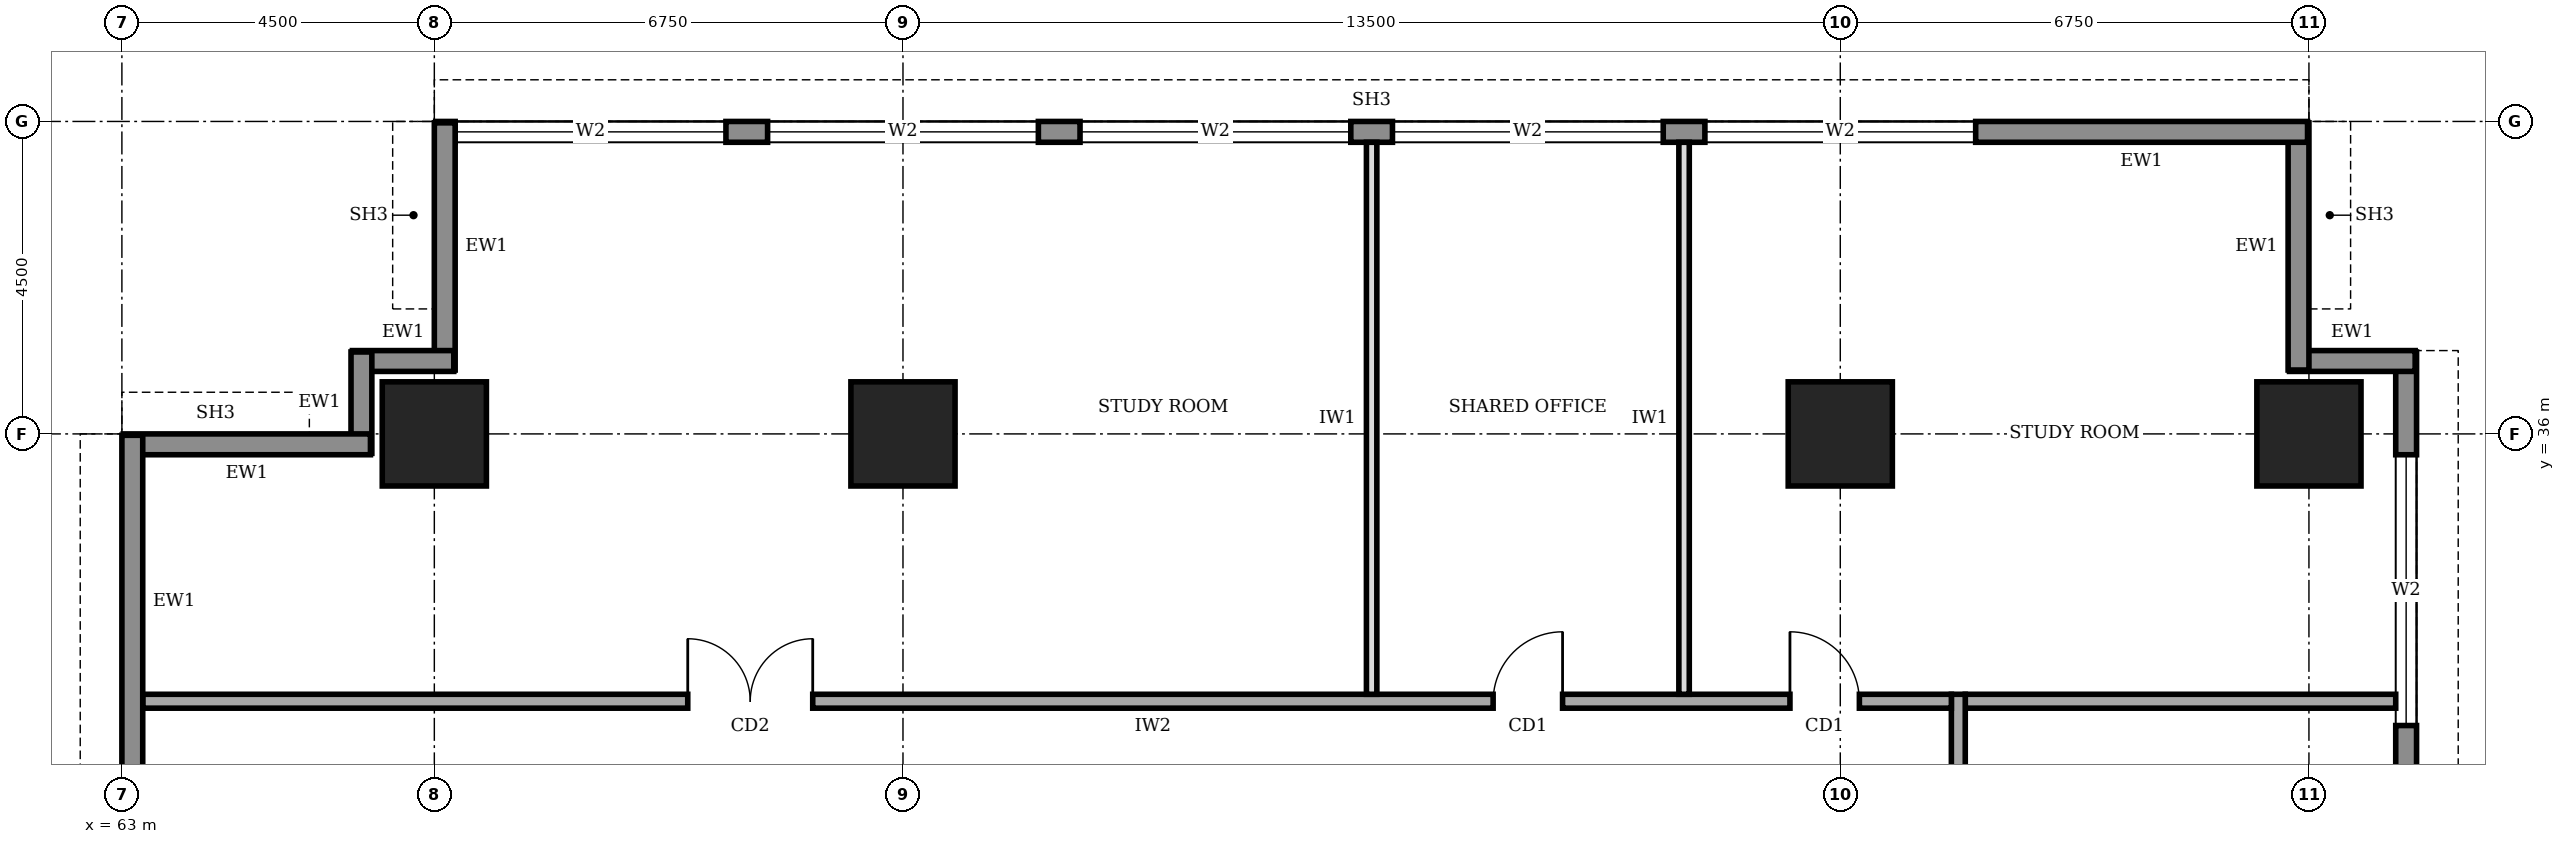
"""IFC4 building model, lengths in metres.
Left out: names, types, materials, properties, quantities, classifications, styles, units other than length and angle.
Written with IfcOpenShell. Run it as: python <this file> out.ifc"""

import sys

from ifc_helpers import new_model, si_unit, direction, frame, frame_2d, origin, origin_2d, place, context, subcontext, project, spatial, rectangle, extrude, element, fill, save


model = new_model("IFC4")
c1 = context("Model", 3, precision=1e-05, world=origin(), true_north=direction((0.0, 1.0)))
c2 = subcontext(c1, "Body", "Model", "MODEL_VIEW")
j1 = project(units=[si_unit("LENGTHUNIT", "METRE"), si_unit("PLANEANGLEUNIT", "RADIAN")], contexts=[c1])
p1 = place(None, origin())
s1 = spatial("IfcSite", under=j1, at=p1, CompositionType="ELEMENT")
p2 = place(p1, origin())
s2 = spatial("IfcBuilding", under=s1, at=p2, CompositionType="ELEMENT")
p3 = place(p2, frame((0.0, 0.0, 153.0)))
s3 = spatial("IfcBuildingStorey", under=s2, at=p3, CompositionType="ELEMENT", Elevation=153.0)
for number, where, z_axis, x_axis in (
    (1, (67.5, 36.0, 0.0), (0.0, 0.0, 1.0), (1.0, 0.0, 0.0)),
    (2, (74.25, 36.0, 0.0), (0.0, 0.0, 1.0), (1.0, 0.0, 0.0)),
    (3, (87.75, 36.0, 0.0), (0.0, 0.0, 1.0), (1.0, 0.0, 0.0)),
    (4, (94.5, 36.0, 0.0), (0.0, 0.0, 1.0), (1.0, 0.0, 0.0)),
):
    element("IfcColumn", number, at=place(p3, frame(where, z_axis=z_axis, x_axis=x_axis)), inside=s3, PredefinedType="COLUMN", context=c2, shape_type="SweptSolid", body=[
        extrude(rectangle(XDim=1.5, YDim=1.5, at=origin_2d()), origin(), (0.0, 0.0, 1.0), 4.0),
    ])
p4 = place(p3, frame((95.9, 3.32, 0.0), z_axis=(0.0, 0.0, 1.0), x_axis=(0.0, 1.0, 0.0)))
e5 = element("IfcWall", 5, at=p4, inside=s3, PredefinedType="STANDARD", context=c2, shape_type="SweptSolid", body=[
    extrude(rectangle(XDim=33.86, YDim=0.3, at=frame_2d((16.93, 0.0))), origin(), (0.0, 0.0, 1.0), 3.75),
])
p5 = place(p4, frame((1.48, 0.0, 0.6)))
e6 = element("IfcOpeningElement", 6, at=p5, cuts=e5, PredefinedType="OPENING", context=c2, shape_type="SweptSolid", body=[
    extrude(rectangle(XDim=3.9, YDim=2.6, at=frame_2d((1.95, 1.3))), frame((0.0, 0.16, 0.0), z_axis=(0.0, -1.0, 0.0), x_axis=(1.0, 0.0, 0.0)), (0.0, 0.0, 1.0), 0.32),
])
p6 = place(p4, frame((5.98, 0.0, 0.6)))
e7 = element("IfcOpeningElement", 7, at=p6, cuts=e5, PredefinedType="OPENING", context=c2, shape_type="SweptSolid", body=[
    extrude(rectangle(XDim=3.9, YDim=2.6, at=frame_2d((1.95, 1.3))), frame((0.0, 0.16, 0.0), z_axis=(0.0, -1.0, 0.0), x_axis=(1.0, 0.0, 0.0)), (0.0, 0.0, 1.0), 0.32),
])
p7 = place(p4, frame((10.48, 0.0, 0.6)))
e8 = element("IfcOpeningElement", 8, at=p7, cuts=e5, PredefinedType="OPENING", context=c2, shape_type="SweptSolid", body=[
    extrude(rectangle(XDim=3.9, YDim=2.6, at=frame_2d((1.95, 1.3))), frame((0.0, 0.16, 0.0), z_axis=(0.0, -1.0, 0.0), x_axis=(1.0, 0.0, 0.0)), (0.0, 0.0, 1.0), 0.32),
])
p8 = place(p4, frame((14.98, 0.0, 0.6)))
e9 = element("IfcOpeningElement", 9, at=p8, cuts=e5, PredefinedType="OPENING", context=c2, shape_type="SweptSolid", body=[
    extrude(rectangle(XDim=3.9, YDim=2.6, at=frame_2d((1.95, 1.3))), frame((0.0, 0.16, 0.0), z_axis=(0.0, -1.0, 0.0), x_axis=(1.0, 0.0, 0.0)), (0.0, 0.0, 1.0), 0.32),
])
p9 = place(p4, frame((19.48, 0.0, 0.6)))
e10 = element("IfcOpeningElement", 10, at=p9, cuts=e5, PredefinedType="OPENING", context=c2, shape_type="SweptSolid", body=[
    extrude(rectangle(XDim=3.9, YDim=2.6, at=frame_2d((1.95, 1.3))), frame((0.0, 0.16, 0.0), z_axis=(0.0, -1.0, 0.0), x_axis=(1.0, 0.0, 0.0)), (0.0, 0.0, 1.0), 0.32),
])
p10 = place(p4, frame((23.98, 0.0, 0.6)))
e11 = element("IfcOpeningElement", 11, at=p10, cuts=e5, PredefinedType="OPENING", context=c2, shape_type="SweptSolid", body=[
    extrude(rectangle(XDim=3.9, YDim=2.6, at=frame_2d((1.95, 1.3))), frame((0.0, 0.16, 0.0), z_axis=(0.0, -1.0, 0.0), x_axis=(1.0, 0.0, 0.0)), (0.0, 0.0, 1.0), 0.32),
])
p11 = place(p4, frame((28.48, 0.0, 0.6)))
e12 = element("IfcOpeningElement", 12, at=p11, cuts=e5, PredefinedType="OPENING", context=c2, shape_type="SweptSolid", body=[
    extrude(rectangle(XDim=3.9, YDim=2.6, at=frame_2d((1.95, 1.3))), frame((0.0, 0.16, 0.0), z_axis=(0.0, -1.0, 0.0), x_axis=(1.0, 0.0, 0.0)), (0.0, 0.0, 1.0), 0.32),
])
p12 = place(p3, frame((96.03, 37.05, 0.0), z_axis=(0.0, 0.0, 1.0), x_axis=(-1.0, 0.0, 0.0)))
e13 = element("IfcWall", 13, at=p12, inside=s3, PredefinedType="STANDARD", context=c2, shape_type="SweptSolid", body=[
    extrude(rectangle(XDim=1.81, YDim=0.3, at=frame_2d((0.905, 0.0))), origin(), (0.0, 0.0, 1.0), 3.75),
])
p13 = place(p3, frame((94.35, 36.92, 0.0), z_axis=(0.0, 0.0, 1.0), x_axis=(0.0, 1.0, 0.0)))
e14 = element("IfcWall", 14, at=p13, inside=s3, PredefinedType="STANDARD", context=c2, shape_type="SweptSolid", body=[
    extrude(rectangle(XDim=3.56, YDim=0.3, at=frame_2d((1.78, 0.0))), origin(), (0.0, 0.0, 1.0), 2.85),
])
p14 = place(p3, frame((94.48, 40.35, 0.0), z_axis=(0.0, 0.0, 1.0), x_axis=(-1.0, 0.0, 0.0)))
e15 = element("IfcWall", 15, at=p14, inside=s3, PredefinedType="STANDARD", context=c2, shape_type="SweptSolid", body=[
    extrude(rectangle(XDim=26.96, YDim=0.3, at=frame_2d((13.48, 0.0))), origin(), (0.0, 0.0, 1.0), 3.75),
])
p15 = place(p14, frame((22.78, 0.0, 0.6)))
e16 = element("IfcOpeningElement", 16, at=p15, cuts=e15, PredefinedType="OPENING", context=c2, shape_type="SweptSolid", body=[
    extrude(rectangle(XDim=3.9, YDim=2.6, at=frame_2d((1.95, 1.3))), frame((0.0, 0.16, 0.0), z_axis=(0.0, -1.0, 0.0), x_axis=(1.0, 0.0, 0.0)), (0.0, 0.0, 1.0), 0.32),
])
p16 = place(p14, frame((18.28, 0.0, 0.6)))
e17 = element("IfcOpeningElement", 17, at=p16, cuts=e15, PredefinedType="OPENING", context=c2, shape_type="SweptSolid", body=[
    extrude(rectangle(XDim=3.9, YDim=2.6, at=frame_2d((1.95, 1.3))), frame((0.0, 0.16, 0.0), z_axis=(0.0, -1.0, 0.0), x_axis=(1.0, 0.0, 0.0)), (0.0, 0.0, 1.0), 0.32),
])
p17 = place(p14, frame((13.78, 0.0, 0.6)))
e18 = element("IfcOpeningElement", 18, at=p17, cuts=e15, PredefinedType="OPENING", context=c2, shape_type="SweptSolid", body=[
    extrude(rectangle(XDim=3.9, YDim=2.6, at=frame_2d((1.95, 1.3))), frame((0.0, 0.16, 0.0), z_axis=(0.0, -1.0, 0.0), x_axis=(1.0, 0.0, 0.0)), (0.0, 0.0, 1.0), 0.32),
])
p18 = place(p14, frame((9.28, 0.0, 0.6)))
e19 = element("IfcOpeningElement", 19, at=p18, cuts=e15, PredefinedType="OPENING", context=c2, shape_type="SweptSolid", body=[
    extrude(rectangle(XDim=3.9, YDim=2.6, at=frame_2d((1.95, 1.3))), frame((0.0, 0.16, 0.0), z_axis=(0.0, -1.0, 0.0), x_axis=(1.0, 0.0, 0.0)), (0.0, 0.0, 1.0), 0.32),
])
p19 = place(p14, frame((4.78, 0.0, 0.6)))
e20 = element("IfcOpeningElement", 20, at=p19, cuts=e15, PredefinedType="OPENING", context=c2, shape_type="SweptSolid", body=[
    extrude(rectangle(XDim=3.9, YDim=2.6, at=frame_2d((1.95, 1.3))), frame((0.0, 0.16, 0.0), z_axis=(0.0, -1.0, 0.0), x_axis=(1.0, 0.0, 0.0)), (0.0, 0.0, 1.0), 0.32),
])
p20 = place(p3, frame((67.65, 40.48, 0.0), z_axis=(0.0, 0.0, 1.0), x_axis=(0.0, -1.0, 0.0)))
e21 = element("IfcWall", 21, at=p20, inside=s3, PredefinedType="STANDARD", context=c2, shape_type="SweptSolid", body=[
    extrude(rectangle(XDim=3.56, YDim=0.3, at=frame_2d((1.78, 0.0))), origin(), (0.0, 0.0, 1.0), 2.85),
])
for number, where, z_axis, x_axis in (
    (22, (67.78, 37.05, 0.0), (0.0, 0.0, 1.0), (-1.0, 0.0, 0.0)),
    (23, (66.45, 37.18, 0.0), (0.0, 0.0, 1.0), (0.0, -1.0, 0.0)),
):
    element("IfcWall", number, at=place(p3, frame(where, z_axis=z_axis, x_axis=x_axis)), inside=s3, PredefinedType="STANDARD", context=c2, shape_type="SweptSolid", body=[
        extrude(rectangle(XDim=1.46, YDim=0.3, at=frame_2d((0.73, 0.0))), origin(), (0.0, 0.0, 1.0), 3.75),
    ])
p21 = place(p3, frame((66.58, 35.85, 0.0), z_axis=(0.0, 0.0, 1.0), x_axis=(-1.0, 0.0, 0.0)))
e24 = element("IfcWall", 24, at=p21, inside=s3, PredefinedType="STANDARD", context=c2, shape_type="SweptSolid", body=[
    extrude(rectangle(XDim=3.56, YDim=0.3, at=frame_2d((1.78, 0.0))), origin(), (0.0, 0.0, 1.0), 2.85),
])
p22 = place(p3, frame((63.15, 35.98, 0.0), z_axis=(0.0, 0.0, 1.0), x_axis=(0.0, -1.0, 0.0)))
e25 = element("IfcWall", 25, at=p22, inside=s3, PredefinedType="STANDARD", context=c2, shape_type="SweptSolid", body=[
    extrude(rectangle(XDim=31.46, YDim=0.3, at=frame_2d((15.73, 0.0))), origin(), (0.0, 0.0, 1.0), 3.75),
])
p23 = place(p22, frame((27.28, 0.0, 0.6)))
e26 = element("IfcOpeningElement", 26, at=p23, cuts=e25, PredefinedType="OPENING", context=c2, shape_type="SweptSolid", body=[
    extrude(rectangle(XDim=3.9, YDim=2.6, at=frame_2d((1.95, 1.3))), frame((0.0, 0.16, 0.0), z_axis=(0.0, -1.0, 0.0), x_axis=(1.0, 0.0, 0.0)), (0.0, 0.0, 1.0), 0.32),
])
p24 = place(p22, frame((22.78, 0.0, 0.6)))
e27 = element("IfcOpeningElement", 27, at=p24, cuts=e25, PredefinedType="OPENING", context=c2, shape_type="SweptSolid", body=[
    extrude(rectangle(XDim=3.9, YDim=2.6, at=frame_2d((1.95, 1.3))), frame((0.0, 0.16, 0.0), z_axis=(0.0, -1.0, 0.0), x_axis=(1.0, 0.0, 0.0)), (0.0, 0.0, 1.0), 0.32),
])
p25 = place(p22, frame((18.28, 0.0, 0.6)))
e28 = element("IfcOpeningElement", 28, at=p25, cuts=e25, PredefinedType="OPENING", context=c2, shape_type="SweptSolid", body=[
    extrude(rectangle(XDim=3.9, YDim=2.6, at=frame_2d((1.95, 1.3))), frame((0.0, 0.16, 0.0), z_axis=(0.0, -1.0, 0.0), x_axis=(1.0, 0.0, 0.0)), (0.0, 0.0, 1.0), 0.32),
])
p26 = place(p22, frame((13.78, 0.0, 0.6)))
e29 = element("IfcOpeningElement", 29, at=p26, cuts=e25, PredefinedType="OPENING", context=c2, shape_type="SweptSolid", body=[
    extrude(rectangle(XDim=3.9, YDim=2.6, at=frame_2d((1.95, 1.3))), frame((0.0, 0.16, 0.0), z_axis=(0.0, -1.0, 0.0), x_axis=(1.0, 0.0, 0.0)), (0.0, 0.0, 1.0), 0.32),
])
p27 = place(p22, frame((9.28, 0.0, 0.6)))
e30 = element("IfcOpeningElement", 30, at=p27, cuts=e25, PredefinedType="OPENING", context=c2, shape_type="SweptSolid", body=[
    extrude(rectangle(XDim=3.9, YDim=2.6, at=frame_2d((1.95, 1.3))), frame((0.0, 0.16, 0.0), z_axis=(0.0, -1.0, 0.0), x_axis=(1.0, 0.0, 0.0)), (0.0, 0.0, 1.0), 0.32),
])
p28 = place(p22, frame((4.78, 0.0, 0.6)))
e31 = element("IfcOpeningElement", 31, at=p28, cuts=e25, PredefinedType="OPENING", context=c2, shape_type="SweptSolid", body=[
    extrude(rectangle(XDim=3.9, YDim=2.6, at=frame_2d((1.95, 1.3))), frame((0.0, 0.16, 0.0), z_axis=(0.0, -1.0, 0.0), x_axis=(1.0, 0.0, 0.0)), (0.0, 0.0, 1.0), 0.32),
])
p29 = place(p3, frame((89.45, 8.45, 0.0), z_axis=(0.0, 0.0, 1.0), x_axis=(0.0, 1.0, 0.0)))
e32 = element("IfcWall", 32, at=p29, inside=s3, PredefinedType="SOLIDWALL", context=c2, shape_type="SweptSolid", body=[
    extrude(rectangle(XDim=23.8, YDim=0.2, at=frame_2d((11.9, 0.0))), origin(), (0.0, 0.0, 1.0), 3.75),
])
p30 = place(p29, frame((1.925, 0.0, 0.0)))
e33 = element("IfcOpeningElement", 33, at=p30, cuts=e32, PredefinedType="OPENING", context=c2, shape_type="SweptSolid", body=[
    extrude(rectangle(XDim=1.0, YDim=2.1, at=frame_2d((0.5, 1.05))), frame((0.0, 0.11, 0.0), z_axis=(0.0, -1.0, 0.0), x_axis=(1.0, 0.0, 0.0)), (0.0, 0.0, 1.0), 0.22),
])
p31 = place(p29, frame((5.65, 0.0, 0.0)))
e34 = element("IfcOpeningElement", 34, at=p31, cuts=e32, PredefinedType="OPENING", context=c2, shape_type="SweptSolid", body=[
    extrude(rectangle(XDim=1.0, YDim=2.1, at=frame_2d((0.5, 1.05))), frame((0.0, 0.11, 0.0), z_axis=(0.0, -1.0, 0.0), x_axis=(1.0, 0.0, 0.0)), (0.0, 0.0, 1.0), 0.22),
])
p32 = place(p29, frame((8.75, 0.0, 0.0)))
e35 = element("IfcOpeningElement", 35, at=p32, cuts=e32, PredefinedType="OPENING", context=c2, shape_type="SweptSolid", body=[
    extrude(rectangle(XDim=0.9, YDim=2.1, at=frame_2d((0.45, 1.05))), frame((0.0, 0.11, 0.0), z_axis=(0.0, -1.0, 0.0), x_axis=(1.0, 0.0, 0.0)), (0.0, 0.0, 1.0), 0.22),
])
p33 = place(p29, frame((11.8, 0.0, 0.0)))
e36 = element("IfcOpeningElement", 36, at=p33, cuts=e32, PredefinedType="OPENING", context=c2, shape_type="SweptSolid", body=[
    extrude(rectangle(XDim=0.9, YDim=2.1, at=frame_2d((0.45, 1.05))), frame((0.0, 0.11, 0.0), z_axis=(0.0, -1.0, 0.0), x_axis=(1.0, 0.0, 0.0)), (0.0, 0.0, 1.0), 0.22),
])
p34 = place(p29, frame((16.5, 0.0, 0.0)))
e37 = element("IfcOpeningElement", 37, at=p34, cuts=e32, PredefinedType="OPENING", context=c2, shape_type="SweptSolid", body=[
    extrude(rectangle(XDim=0.9, YDim=2.1, at=frame_2d((0.45, 1.05))), frame((0.0, 0.11, 0.0), z_axis=(0.0, -1.0, 0.0), x_axis=(1.0, 0.0, 0.0)), (0.0, 0.0, 1.0), 0.22),
])
p35 = place(p29, frame((13.85, 0.0, 0.0)))
e38 = element("IfcOpeningElement", 38, at=p35, cuts=e32, PredefinedType="OPENING", context=c2, shape_type="SweptSolid", body=[
    extrude(rectangle(XDim=1.0, YDim=2.1, at=frame_2d((0.5, 1.05))), frame((0.0, 0.11, 0.0), z_axis=(0.0, -1.0, 0.0), x_axis=(1.0, 0.0, 0.0)), (0.0, 0.0, 1.0), 0.22),
])
p36 = place(p29, frame((20.675, 0.0, 0.0)))
e39 = element("IfcOpeningElement", 39, at=p36, cuts=e32, PredefinedType="OPENING", context=c2, shape_type="SweptSolid", body=[
    extrude(rectangle(XDim=1.0, YDim=2.1, at=frame_2d((0.5, 1.05))), frame((0.0, 0.11, 0.0), z_axis=(0.0, -1.0, 0.0), x_axis=(1.0, 0.0, 0.0)), (0.0, 0.0, 1.0), 0.22),
])
p37 = place(p3, frame((89.35, 32.15, 0.0), z_axis=(0.0, 0.0, 1.0), x_axis=(-1.0, 0.0, 0.0)))
e40 = element("IfcWall", 40, at=p37, inside=s3, PredefinedType="SOLIDWALL", context=c2, shape_type="SweptSolid", body=[
    extrude(rectangle(XDim=26.05, YDim=0.2, at=frame_2d((13.025, 0.0))), origin(), (0.0, 0.0, 1.0), 3.75),
])
p38 = place(p37, frame((16.4, 0.0, 0.0)))
e41 = element("IfcOpeningElement", 41, at=p38, cuts=e40, PredefinedType="OPENING", context=c2, shape_type="SweptSolid", body=[
    extrude(rectangle(XDim=1.8, YDim=2.1, at=frame_2d((0.9, 1.05))), frame((0.0, 0.11, 0.0), z_axis=(0.0, -1.0, 0.0), x_axis=(1.0, 0.0, 0.0)), (0.0, 0.0, 1.0), 0.22),
])
p39 = place(p37, frame((5.6, 0.0, 0.0)))
e42 = element("IfcOpeningElement", 42, at=p39, cuts=e40, PredefinedType="OPENING", context=c2, shape_type="SweptSolid", body=[
    extrude(rectangle(XDim=1.0, YDim=2.1, at=frame_2d((0.5, 1.05))), frame((0.0, 0.11, 0.0), z_axis=(0.0, -1.0, 0.0), x_axis=(1.0, 0.0, 0.0)), (0.0, 0.0, 1.0), 0.22),
])
p40 = place(p37, frame((1.325, 0.0, 0.0)))
e43 = element("IfcOpeningElement", 43, at=p40, cuts=e40, PredefinedType="OPENING", context=c2, shape_type="SweptSolid", body=[
    extrude(rectangle(XDim=1.0, YDim=2.1, at=frame_2d((0.5, 1.05))), frame((0.0, 0.11, 0.0), z_axis=(0.0, -1.0, 0.0), x_axis=(1.0, 0.0, 0.0)), (0.0, 0.0, 1.0), 0.22),
])
p41 = place(p3, frame((89.55, 32.15, 0.0), z_axis=(0.0, 0.0, 1.0), x_axis=(1.0, 0.0, 0.0)))
e44 = element("IfcWall", 44, at=p41, inside=s3, PredefinedType="SOLIDWALL", context=c2, shape_type="SweptSolid", body=[
    extrude(rectangle(XDim=6.2, YDim=0.2, at=frame_2d((3.1, 0.0))), origin(), (0.0, 0.0, 1.0), 3.75),
])
for number, where, z_axis, x_axis in (
    (45, (81.0, 32.25, 0.0), (0.0, 0.0, 1.0), (0.0, 1.0, 0.0)),
    (46, (85.5, 32.25, 0.0), (0.0, 0.0, 1.0), (0.0, 1.0, 0.0)),
):
    element("IfcWall", number, at=place(p3, frame(where, z_axis=z_axis, x_axis=x_axis)), inside=s3, PredefinedType="PARTITIONING", context=c2, shape_type="SweptSolid", body=[
        extrude(rectangle(XDim=7.95, YDim=0.15, at=frame_2d((3.975, 0.0))), origin(), (0.0, 0.0, 1.0), 3.75),
    ])
p42 = place(p11, origin())
e47 = element("IfcWindow", 47, at=p42, inside=s3, PartitioningType="SINGLE_PANEL", PredefinedType="WINDOW", context=c2, shape_type="SweptSolid", body=[
    extrude(rectangle(XDim=3.9, YDim=2.6, at=frame_2d((1.95, 1.3))), frame((0.0, 0.03, 0.0), z_axis=(0.0, -1.0, 0.0), x_axis=(1.0, 0.0, 0.0)), (0.0, 0.0, 1.0), 0.06),
])
fill(e12, e47)
p43 = place(p15, origin())
e48 = element("IfcWindow", 48, at=p43, inside=s3, PartitioningType="SINGLE_PANEL", PredefinedType="WINDOW", context=c2, shape_type="SweptSolid", body=[
    extrude(rectangle(XDim=3.9, YDim=2.6, at=frame_2d((1.95, 1.3))), frame((0.0, 0.03, 0.0), z_axis=(0.0, -1.0, 0.0), x_axis=(1.0, 0.0, 0.0)), (0.0, 0.0, 1.0), 0.06),
])
fill(e16, e48)
p44 = place(p16, origin())
e49 = element("IfcWindow", 49, at=p44, inside=s3, PartitioningType="SINGLE_PANEL", PredefinedType="WINDOW", context=c2, shape_type="SweptSolid", body=[
    extrude(rectangle(XDim=3.9, YDim=2.6, at=frame_2d((1.95, 1.3))), frame((0.0, 0.03, 0.0), z_axis=(0.0, -1.0, 0.0), x_axis=(1.0, 0.0, 0.0)), (0.0, 0.0, 1.0), 0.06),
])
fill(e17, e49)
p45 = place(p17, origin())
e50 = element("IfcWindow", 50, at=p45, inside=s3, PartitioningType="SINGLE_PANEL", PredefinedType="WINDOW", context=c2, shape_type="SweptSolid", body=[
    extrude(rectangle(XDim=3.9, YDim=2.6, at=frame_2d((1.95, 1.3))), frame((0.0, 0.03, 0.0), z_axis=(0.0, -1.0, 0.0), x_axis=(1.0, 0.0, 0.0)), (0.0, 0.0, 1.0), 0.06),
])
fill(e18, e50)
p46 = place(p18, origin())
e51 = element("IfcWindow", 51, at=p46, inside=s3, PartitioningType="SINGLE_PANEL", PredefinedType="WINDOW", context=c2, shape_type="SweptSolid", body=[
    extrude(rectangle(XDim=3.9, YDim=2.6, at=frame_2d((1.95, 1.3))), frame((0.0, 0.03, 0.0), z_axis=(0.0, -1.0, 0.0), x_axis=(1.0, 0.0, 0.0)), (0.0, 0.0, 1.0), 0.06),
])
fill(e19, e51)
p47 = place(p19, origin())
e52 = element("IfcWindow", 52, at=p47, inside=s3, PartitioningType="SINGLE_PANEL", PredefinedType="WINDOW", context=c2, shape_type="SweptSolid", body=[
    extrude(rectangle(XDim=3.9, YDim=2.6, at=frame_2d((1.95, 1.3))), frame((0.0, 0.03, 0.0), z_axis=(0.0, -1.0, 0.0), x_axis=(1.0, 0.0, 0.0)), (0.0, 0.0, 1.0), 0.06),
])
fill(e20, e52)
p48 = place(p38, frame((1.8, 0.0, 0.0), z_axis=(0.0, 0.0, 1.0), x_axis=(-1.0, 0.0, 0.0)))
e53 = element("IfcDoor", 53, at=p48, inside=s3, OperationType="DOUBLE_DOOR_SINGLE_SWING", PredefinedType="DOOR", context=c2, shape_type="SweptSolid", body=[
    extrude(rectangle(XDim=1.8, YDim=2.1, at=frame_2d((0.9, 1.05))), frame((0.0, 0.025, 0.0), z_axis=(0.0, -1.0, 0.0), x_axis=(1.0, 0.0, 0.0)), (0.0, 0.0, 1.0), 0.05),
])
fill(e41, e53)
p49 = place(p39, frame((1.0, 0.0, 0.0), z_axis=(0.0, 0.0, 1.0), x_axis=(-1.0, 0.0, 0.0)))
e54 = element("IfcDoor", 54, at=p49, inside=s3, OperationType="SINGLE_SWING_RIGHT", PredefinedType="DOOR", context=c2, shape_type="SweptSolid", body=[
    extrude(rectangle(XDim=1.0, YDim=2.1, at=frame_2d((0.5, 1.05))), frame((0.0, 0.025, 0.0), z_axis=(0.0, -1.0, 0.0), x_axis=(1.0, 0.0, 0.0)), (0.0, 0.0, 1.0), 0.05),
])
fill(e42, e54)
p50 = place(p40, frame((1.0, 0.0, 0.0), z_axis=(0.0, 0.0, 1.0), x_axis=(-1.0, 0.0, 0.0)))
e55 = element("IfcDoor", 55, at=p50, inside=s3, OperationType="SINGLE_SWING_LEFT", PredefinedType="DOOR", context=c2, shape_type="SweptSolid", body=[
    extrude(rectangle(XDim=1.0, YDim=2.1, at=frame_2d((0.5, 1.05))), frame((0.0, 0.025, 0.0), z_axis=(0.0, -1.0, 0.0), x_axis=(1.0, 0.0, 0.0)), (0.0, 0.0, 1.0), 0.05),
])
fill(e43, e55)
save(model, sys.argv[1])
